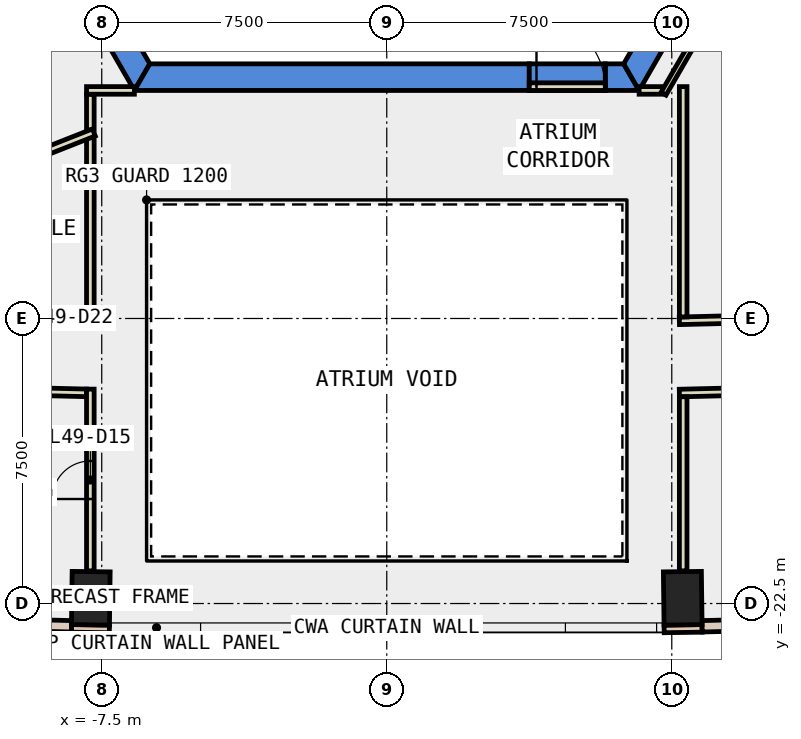
"""IFC4 building model, lengths in metres.
Left out: names, types, materials, properties, quantities, classifications, styles, units other than length and angle.
Written with IfcOpenShell. Run it as: python <this file> out.ifc"""

import sys

from ifc_helpers import new_model, si_unit, direction, frame, frame_2d, origin, origin_2d, place, context, subcontext, project, spatial, polyline, rectangle, outline, extrude, element, fill, save


model = new_model("IFC4")
c1 = context("Model", 3, precision=1e-05, world=origin(), true_north=direction((0.0, 1.0)))
c2 = subcontext(c1, "Body", "Model", "MODEL_VIEW")
j1 = project(units=[si_unit("LENGTHUNIT", "METRE"), si_unit("PLANEANGLEUNIT", "RADIAN")], contexts=[c1])
p1 = place(None, origin())
s1 = spatial("IfcSite", under=j1, at=p1, CompositionType="ELEMENT")
p2 = place(p1, origin())
s2 = spatial("IfcBuilding", under=s1, at=p2, CompositionType="ELEMENT")
p3 = place(p2, frame((0.0, 0.0, 219.2)))
s3 = spatial("IfcBuildingStorey", under=s2, at=p3, CompositionType="ELEMENT", Elevation=219.2)
for number, where, z_axis, x_axis in (
    (1, (-7.788, -22.361, -0.4), (0.0, 0.0, 1.0), (-1.0, 0.013, 0.0)),
    (2, (7.788, -22.361, -0.4), (0.0, 0.0, 1.0), (1.0, 0.013, 0.0)),
):
    element("IfcColumn", number, at=place(p3, frame(where, z_axis=z_axis, x_axis=x_axis)), inside=s3, PredefinedType="COLUMN", context=c2, shape_type="SweptSolid", body=[
        extrude(rectangle(XDim=1.0, YDim=1.4, at=origin_2d()), origin(), (0.0, 0.0, 1.0), 4.2),
    ])
p4 = place(p3, frame((0.0, 0.0, -0.4)))
e3 = element("IfcWall", 3, at=p4, inside=s3, PredefinedType="SHEAR", context=c2, shape_type="SweptSolid", body=[
    extrude(outline(polyline([(-13.279, 2.5), (-6.64, -9.0), (-6.235, -8.3), (-12.471, 2.5), (-13.279, 2.5)])), origin(), (0.0, 0.0, 1.0), 4.2),
])
p5 = place(p3, frame((0.0, 0.0, -0.4)))
e4 = element("IfcWall", 4, at=p5, inside=s3, PredefinedType="SHEAR", context=c2, shape_type="SweptSolid", body=[
    extrude(outline(polyline([(3.75, -9.0), (3.75, -8.3), (-6.235, -8.3), (-6.64, -9.0), (3.75, -9.0)])), origin(), (0.0, 0.0, 1.0), 4.2),
])
p6 = place(p3, frame((0.0, 0.0, -0.4)))
e5 = element("IfcWall", 5, at=p6, inside=s3, PredefinedType="SHEAR", context=c2, shape_type="SweptSolid", body=[
    extrude(outline(polyline([(5.75, -8.3), (5.75, -9.0), (6.64, -9.0), (6.235, -8.3), (5.75, -8.3)])), origin(), (0.0, 0.0, 1.0), 4.2),
])
p7 = place(p3, frame((0.0, 0.0, 3.6)))
e6 = element("IfcWall", 6, at=p7, inside=s3, PredefinedType="SHEAR", context=c2, shape_type="SweptSolid", body=[
    extrude(outline(polyline([(5.75, -9.0), (5.75, -8.3), (3.75, -8.3), (3.75, -9.0), (5.75, -9.0)])), origin(), (0.0, 0.0, 1.0), 0.2),
])
p8 = place(p3, frame((0.0, 0.0, -0.4)))
e7 = element("IfcWall", 7, at=p8, inside=s3, PredefinedType="SHEAR", context=c2, shape_type="SweptSolid", body=[
    extrude(outline(polyline([(6.64, -9.0), (13.279, 2.5), (12.471, 2.5), (6.235, -8.3), (6.64, -9.0)])), origin(), (0.0, 0.0, 1.0), 4.2),
])
for number, where, z_axis, x_axis in (
    (8, (8.877, -5.125, -0.4), (0.0, 0.0, 1.0), (0.866, -0.5, 0.0)),
    (9, (-8.877, -5.125, -0.4), (0.0, 0.0, 1.0), (-0.866, -0.5, 0.0)),
):
    element("IfcWall", number, at=place(p3, frame(where, z_axis=z_axis, x_axis=x_axis)), inside=s3, PredefinedType="SHEAR", context=c2, shape_type="SweptSolid", body=[
        extrude(rectangle(XDim=9.0, YDim=0.8, at=frame_2d((4.5, 0.0))), origin(), (0.0, 0.0, 1.0), 4.2),
    ])
for number, where, z_axis, x_axis in (
    (10, (-8.299, -23.154, 0.0), (0.0, 0.0, 1.0), (1.0, -0.014, 0.0)),
    (11, (7.299, -23.168, 0.0), (0.0, 0.0, 1.0), (1.0, 0.014, 0.0)),
):
    element("IfcWall", number, at=place(p3, frame(where, z_axis=z_axis, x_axis=x_axis)), inside=s3, PredefinedType="STANDARD", context=c2, shape_type="SweptSolid", body=[
        extrude(rectangle(XDim=1.0, YDim=0.2, at=frame_2d((0.5, 0.0))), origin(), (0.0, 0.0, 1.0), 3.8),
    ])
p9 = place(p3, frame((-13.681, -22.969, 0.0), z_axis=(0.0, 0.0, 1.0), x_axis=(0.999708030006, -0.024163086341, 0.0)))
e12 = element("IfcWall", 12, at=p9, inside=s3, PredefinedType="STANDARD", context=c2, shape_type="SweptSolid", body=[
    extrude(rectangle(XDim=5.385, YDim=0.3, at=frame_2d((2.693, 0.0))), origin(), (0.0, 0.0, 1.0), 3.8),
])
p10 = place(p9, frame((0.646, 0.0, 0.9)))
e13 = element("IfcOpeningElement", 13, at=p10, cuts=e12, PredefinedType="OPENING", context=c2, shape_type="SweptSolid", body=[
    extrude(rectangle(XDim=1.4, YDim=2.6, at=frame_2d((0.7, 1.3))), frame((0.0, 0.16, 0.0), z_axis=(0.0, -1.0, 0.0), x_axis=(1.0, 0.0, 0.0)), (0.0, 0.0, 1.0), 0.32),
])
p11 = place(p9, frame((3.339, 0.0, 0.9)))
e14 = element("IfcOpeningElement", 14, at=p11, cuts=e12, PredefinedType="OPENING", context=c2, shape_type="SweptSolid", body=[
    extrude(rectangle(XDim=1.4, YDim=2.6, at=frame_2d((0.7, 1.3))), frame((0.0, 0.16, 0.0), z_axis=(0.0, -1.0, 0.0), x_axis=(1.0, 0.0, 0.0)), (0.0, 0.0, 1.0), 0.32),
])
p12 = place(p3, frame((8.297, -23.099, 0.0), z_axis=(0.0, 0.0, 1.0), x_axis=(0.999708030006, 0.024163086341, 0.0)))
e15 = element("IfcWall", 15, at=p12, inside=s3, PredefinedType="STANDARD", context=c2, shape_type="SweptSolid", body=[
    extrude(rectangle(XDim=5.385, YDim=0.3, at=frame_2d((2.693, 0.0))), origin(), (0.0, 0.0, 1.0), 3.8),
])
p13 = place(p12, frame((0.646, 0.0, 0.9)))
e16 = element("IfcOpeningElement", 16, at=p13, cuts=e15, PredefinedType="OPENING", context=c2, shape_type="SweptSolid", body=[
    extrude(rectangle(XDim=1.4, YDim=2.6, at=frame_2d((0.7, 1.3))), frame((0.0, 0.16, 0.0), z_axis=(0.0, -1.0, 0.0), x_axis=(1.0, 0.0, 0.0)), (0.0, 0.0, 1.0), 0.32),
])
p14 = place(p12, frame((3.339, 0.0, 0.9)))
e17 = element("IfcOpeningElement", 17, at=p14, cuts=e15, PredefinedType="OPENING", context=c2, shape_type="SweptSolid", body=[
    extrude(rectangle(XDim=1.4, YDim=2.6, at=frame_2d((0.7, 1.3))), frame((0.0, 0.16, 0.0), z_axis=(0.0, -1.0, 0.0), x_axis=(1.0, 0.0, 0.0)), (0.0, 0.0, 1.0), 0.32),
])
p15 = place(p3, frame((7.7, -15.061, 0.0), z_axis=(0.0, 0.0, 1.0), x_axis=(0.999709615165, 0.024097413707, 0.0)))
e18 = element("IfcWall", 18, at=p15, inside=s3, PredefinedType="PARTITIONING", context=c2, shape_type="SweptSolid", body=[
    extrude(rectangle(XDim=6.231, YDim=0.2, at=frame_2d((3.115, 0.0))), origin(), (0.0, 0.0, 1.0), 3.8),
])
p16 = place(p15, frame((2.615, 0.0, 0.0)))
e19 = element("IfcOpeningElement", 19, at=p16, cuts=e18, PredefinedType="OPENING", context=c2, shape_type="SweptSolid", body=[
    extrude(rectangle(XDim=1.0, YDim=2.1, at=frame_2d((0.5, 1.05))), frame((0.0, 0.11, 0.0), z_axis=(0.0, -1.0, 0.0), x_axis=(1.0, 0.0, 0.0)), (0.0, 0.0, 1.0), 0.22),
])
p17 = place(p3, frame((-13.246, -14.927, 0.0), z_axis=(0.0, 0.0, 1.0), x_axis=(0.999708107757, -0.024159869312, 0.0)))
e20 = element("IfcWall", 20, at=p17, inside=s3, PredefinedType="PARTITIONING", context=c2, shape_type="SweptSolid", body=[
    extrude(rectangle(XDim=5.548, YDim=0.2, at=frame_2d((2.774, 0.0))), origin(), (0.0, 0.0, 1.0), 3.8),
])
p18 = place(p17, frame((2.274, 0.0, 0.0)))
e21 = element("IfcOpeningElement", 21, at=p18, cuts=e20, PredefinedType="OPENING", context=c2, shape_type="SweptSolid", body=[
    extrude(rectangle(XDim=1.0, YDim=2.1, at=frame_2d((0.5, 1.05))), frame((0.0, 0.11, 0.0), z_axis=(0.0, -1.0, 0.0), x_axis=(1.0, 0.0, 0.0)), (0.0, 0.0, 1.0), 0.22),
])
p19 = place(p3, frame((14.063, -16.808, 0.0), z_axis=(0.0, 0.0, 1.0), x_axis=(-0.999707980382, -0.024165139379, 0.0)))
e22 = element("IfcWall", 22, at=p19, inside=s3, PredefinedType="PARTITIONING", context=c2, shape_type="SweptSolid", body=[
    extrude(rectangle(XDim=6.365, YDim=0.2, at=frame_2d((3.183, 0.0))), origin(), (0.0, 0.0, 1.0), 3.8),
])
p20 = place(p19, frame((2.683, 0.0, 0.0)))
e23 = element("IfcOpeningElement", 23, at=p20, cuts=e22, PredefinedType="OPENING", context=c2, shape_type="SweptSolid", body=[
    extrude(rectangle(XDim=1.0, YDim=2.1, at=frame_2d((0.5, 1.05))), frame((0.0, 0.11, 0.0), z_axis=(0.0, -1.0, 0.0), x_axis=(1.0, 0.0, 0.0)), (0.0, 0.0, 1.0), 0.22),
])
p21 = place(p3, frame((-7.9, -16.957, 0.0), z_axis=(0.0, 0.0, 1.0), x_axis=(-0.999709338637, 0.024108883071, 0.0)))
e24 = element("IfcWall", 24, at=p21, inside=s3, PredefinedType="PARTITIONING", context=c2, shape_type="SweptSolid", body=[
    extrude(rectangle(XDim=2.866, YDim=0.2, at=frame_2d((1.433, 0.0))), origin(), (0.0, 0.0, 1.0), 3.8),
])
p22 = place(p3, frame((6.641, -8.999, 0.0), z_axis=(0.0, 0.0, 1.0), x_axis=(1.0, 0.0, 0.0)))
e25 = element("IfcWall", 25, at=p22, inside=s3, PredefinedType="PARTITIONING", context=c2, shape_type="SweptSolid", body=[
    extrude(rectangle(XDim=0.617, YDim=0.2, at=frame_2d((0.309, 0.0))), origin(), (0.0, 0.0, 1.0), 3.8),
])
p23 = place(p3, frame((7.283, -9.086, 0.0), z_axis=(0.0, 0.0, 1.0), x_axis=(0.500035303972, 0.866005020067, 0.0)))
e26 = element("IfcWall", 26, at=p23, inside=s3, PredefinedType="PARTITIONING", context=c2, shape_type="SweptSolid", body=[
    extrude(rectangle(XDim=3.828, YDim=0.15, at=frame_2d((1.914, 0.0))), origin(), (0.0, 0.0, 1.0), 3.8),
])
p24 = place(p3, frame((7.8, -8.899, 0.0), z_axis=(0.0, 0.0, 1.0), x_axis=(0.0, -1.0, 0.0)))
e27 = element("IfcWall", 27, at=p24, inside=s3, PredefinedType="PARTITIONING", context=c2, shape_type="SweptSolid", body=[
    extrude(rectangle(XDim=6.06, YDim=0.2, at=frame_2d((3.03, 0.0))), origin(), (0.0, 0.0, 1.0), 3.8),
])
p25 = place(p3, frame((-7.8, -10.041, 0.0), z_axis=(0.0, 0.0, 1.0), x_axis=(0.0, 1.0, 0.0)))
e28 = element("IfcWall", 28, at=p25, inside=s3, PredefinedType="PARTITIONING", context=c2, shape_type="SweptSolid", body=[
    extrude(rectangle(XDim=0.942, YDim=0.2, at=frame_2d((0.471, 0.0))), origin(), (0.0, 0.0, 1.0), 3.8),
])
p26 = place(p3, frame((-7.9, -8.999, 0.0), z_axis=(0.0, 0.0, 1.0), x_axis=(1.0, 0.0, 0.0)))
e29 = element("IfcWall", 29, at=p26, inside=s3, PredefinedType="PARTITIONING", context=c2, shape_type="SweptSolid", body=[
    extrude(rectangle(XDim=1.259, YDim=0.2, at=frame_2d((0.629, 0.0))), origin(), (0.0, 0.0, 1.0), 3.8),
])
p27 = place(p3, frame((-7.8, -14.959, 0.0), z_axis=(0.0, 0.0, 1.0), x_axis=(0.0, 1.0, 0.0)))
e30 = element("IfcWall", 30, at=p27, inside=s3, PredefinedType="PARTITIONING", context=c2, shape_type="SweptSolid", body=[
    extrude(rectangle(XDim=4.718, YDim=0.2, at=frame_2d((2.359, 0.0))), origin(), (0.0, 0.0, 1.0), 3.8),
])
p28 = place(p3, frame((7.8, -17.059, 0.0), z_axis=(0.0, 0.0, 1.0), x_axis=(0.0, -1.0, 0.0)))
e31 = element("IfcWall", 31, at=p28, inside=s3, PredefinedType="PARTITIONING", context=c2, shape_type="SweptSolid", body=[
    extrude(rectangle(XDim=4.582, YDim=0.2, at=frame_2d((2.291, 0.0))), origin(), (0.0, 0.0, 1.0), 3.8),
])
p29 = place(p3, frame((-7.8, -21.641, 0.0), z_axis=(0.0, 0.0, 1.0), x_axis=(0.0, 1.0, 0.0)))
e32 = element("IfcWall", 32, at=p29, inside=s3, PredefinedType="PARTITIONING", context=c2, shape_type="SweptSolid", body=[
    extrude(rectangle(XDim=4.782, YDim=0.2, at=frame_2d((2.391, 0.0))), origin(), (0.0, 0.0, 1.0), 3.8),
])
p30 = place(p29, frame((1.891, 0.0, 0.0)))
e33 = element("IfcOpeningElement", 33, at=p30, cuts=e32, PredefinedType="OPENING", context=c2, shape_type="SweptSolid", body=[
    extrude(rectangle(XDim=1.0, YDim=2.1, at=frame_2d((0.5, 1.05))), frame((0.0, 0.11, 0.0), z_axis=(0.0, -1.0, 0.0), x_axis=(1.0, 0.0, 0.0)), (0.0, 0.0, 1.0), 0.22),
])
p31 = place(p3, frame((-7.707, -10.105, 0.0), z_axis=(0.0, 0.0, 1.0), x_axis=(-0.930316800812, -0.36675693603, 0.0)))
e34 = element("IfcWall", 34, at=p31, inside=s3, PredefinedType="PARTITIONING", context=c2, shape_type="SweptSolid", body=[
    extrude(rectangle(XDim=7.302, YDim=0.2, at=frame_2d((3.651, 0.0))), origin(), (0.0, 0.0, 1.0), 3.8),
])
p32 = place(p3, frame((3.75, -8.9, 0.0), z_axis=(0.0, 0.0, 1.0), x_axis=(1.0, 0.0, 0.0)))
e35 = element("IfcWall", 35, at=p32, inside=s3, PredefinedType="PARTITIONING", context=c2, shape_type="SweptSolid", body=[
    extrude(rectangle(XDim=2.0, YDim=0.2, at=frame_2d((1.0, 0.0))), origin(), (0.0, 0.0, 1.0), 2.4),
])
p33 = place(p32, frame((0.19, 0.0, 0.0)))
e36 = element("IfcOpeningElement", 36, at=p33, cuts=e35, PredefinedType="OPENING", context=c2, shape_type="SweptSolid", body=[
    extrude(rectangle(XDim=1.8, YDim=2.1, at=frame_2d((0.9, 1.05))), frame((0.0, 0.11, 0.0), z_axis=(0.0, -1.0, 0.0), x_axis=(1.0, 0.0, 0.0)), (0.0, 0.0, 1.0), 0.22),
])
p34 = place(p30, origin())
e37 = element("IfcDoor", 37, at=p34, inside=s3, OperationType="SINGLE_SWING_LEFT", PredefinedType="DOOR", context=c2, shape_type="SweptSolid", body=[
    extrude(rectangle(XDim=1.0, YDim=2.1, at=frame_2d((0.5, 1.05))), frame((0.0, 0.025, 0.0), z_axis=(0.0, -1.0, 0.0), x_axis=(1.0, 0.0, 0.0)), (0.0, 0.0, 1.0), 0.05),
])
fill(e33, e37)
p35 = place(p33, origin())
e38 = element("IfcDoor", 38, at=p35, inside=s3, OperationType="DOUBLE_DOOR_SINGLE_SWING", PredefinedType="DOOR", context=c2, shape_type="SweptSolid", body=[
    extrude(rectangle(XDim=1.8, YDim=2.1, at=frame_2d((0.9, 1.05))), frame((0.0, 0.025, 0.0), z_axis=(0.0, -1.0, 0.0), x_axis=(1.0, 0.0, 0.0)), (0.0, 0.0, 1.0), 0.05),
])
fill(e36, e38)
save(model, sys.argv[1])
